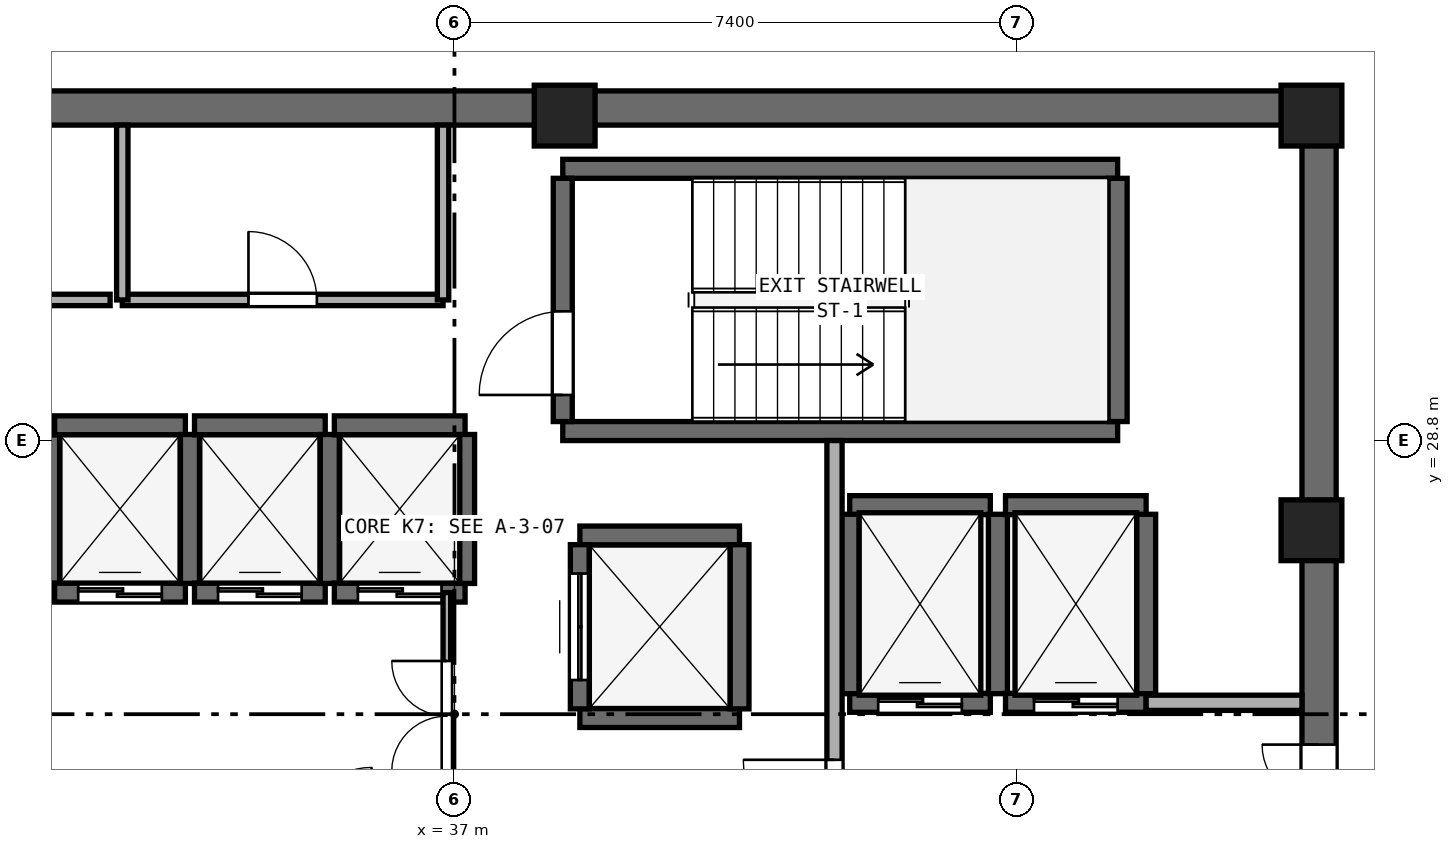
"""IFC4 building model, lengths in metres.
Left out: names, types, materials, properties, quantities, classifications, styles, units other than length and angle.
Written with IfcOpenShell. Run it as: python <this file> out.ifc"""

import sys

from ifc_helpers import new_model, si_unit, direction, frame, frame_2d, origin, origin_2d, place, context, subcontext, project, spatial, rectangle, extrude, element, fill, save


model = new_model("IFC4")
c1 = context("Model", 3, precision=1e-05, world=origin(), true_north=direction((0.0, 1.0)))
c2 = subcontext(c1, "Body", "Model", "MODEL_VIEW")
j1 = project(units=[si_unit("LENGTHUNIT", "METRE"), si_unit("PLANEANGLEUNIT", "RADIAN")], contexts=[c1])
p1 = place(None, origin())
s1 = spatial("IfcSite", under=j1, at=p1, CompositionType="ELEMENT")
p2 = place(p1, origin())
s2 = spatial("IfcBuilding", under=s1, at=p2, CompositionType="ELEMENT")
p3 = place(p2, frame((0.0, 0.0, 225.0)))
s3 = spatial("IfcBuildingStorey", under=s2, at=p3, CompositionType="ELEMENT", Elevation=225.0)
p4 = place(p3, frame((25.4, 33.175, 0.0), z_axis=(0.0, 0.0, 1.0), x_axis=(1.0, 0.0, 0.0)))
e1 = element("IfcWall", 1, at=p4, inside=s3, PredefinedType="SHEAR", context=c2, shape_type="SweptSolid", body=[
    extrude(rectangle(XDim=23.2, YDim=0.45, at=frame_2d((11.6, 0.0))), origin(), (0.0, 0.0, 1.0), 3.51),
])
p5 = place(p3, frame((48.375, 17.45, 0.0), z_axis=(0.0, 0.0, 1.0), x_axis=(0.0, 1.0, 0.0)))
e2 = element("IfcWall", 2, at=p5, inside=s3, PredefinedType="SHEAR", context=c2, shape_type="SweptSolid", body=[
    extrude(rectangle(XDim=15.5, YDim=0.45, at=frame_2d((7.75, 0.0))), origin(), (0.0, 0.0, 1.0), 3.51),
])
p6 = place(p5, frame((5.85, 0.0, 0.0)))
e3 = element("IfcOpeningElement", 3, at=p6, cuts=e2, PredefinedType="OPENING", context=c2, shape_type="SweptSolid", body=[
    extrude(rectangle(XDim=1.5, YDim=2.15, at=frame_2d((0.75, 1.075))), frame((0.0, 0.235, 0.0), z_axis=(0.0, -1.0, 0.0), x_axis=(1.0, 0.0, 0.0)), (0.0, 0.0, 1.0), 0.47),
])
for number, where, z_axis, x_axis in (
    (4, (48.275, 27.62, 0.0), (0.0, 0.0, 1.0), (1.0, 0.0, 0.0)),
    (5, (48.275, 33.075, 0.0), (0.0, 0.0, 1.0), (1.0, 0.0, 0.0)),
    (6, (38.45, 33.075, 0.0), (0.0, 0.0, 1.0), (1.0, 0.0, 0.0)),
):
    element("IfcColumn", number, at=place(p3, frame(where, z_axis=z_axis, x_axis=x_axis)), inside=s3, PredefinedType="PILASTER", context=c2, shape_type="SweptSolid", body=[
        extrude(rectangle(XDim=0.8, YDim=0.8, at=origin_2d()), origin(), (0.0, 0.0, 1.0), 3.8),
    ])
for number, where, z_axis, x_axis in (
    (7, (38.425, 28.925, 0.0), (0.0, 0.0, 1.0), (1.0, 0.0, 0.0)),
    (8, (38.425, 32.375, 0.0), (0.0, 0.0, 1.0), (1.0, 0.0, 0.0)),
):
    element("IfcWall", number, at=place(p3, frame(where, z_axis=z_axis, x_axis=x_axis)), inside=s3, PredefinedType="SHEAR", context=c2, shape_type="SweptSolid", body=[
        extrude(rectangle(XDim=7.3, YDim=0.25, at=frame_2d((3.65, 0.0))), origin(), (0.0, 0.0, 1.0), 3.51),
    ])
p7 = place(p3, frame((38.425, 29.05, 0.0), z_axis=(0.0, 0.0, 1.0), x_axis=(0.0, 1.0, 0.0)))
e9 = element("IfcWall", 9, at=p7, inside=s3, PredefinedType="SHEAR", context=c2, shape_type="SweptSolid", body=[
    extrude(rectangle(XDim=3.2, YDim=0.25, at=frame_2d((1.6, 0.0))), origin(), (0.0, 0.0, 1.0), 3.51),
])
p8 = place(p7, frame((0.35, 0.0, 0.0)))
e10 = element("IfcOpeningElement", 10, at=p8, cuts=e9, PredefinedType="OPENING", context=c2, shape_type="SweptSolid", body=[
    extrude(rectangle(XDim=1.1, YDim=2.15, at=frame_2d((0.55, 1.075))), frame((0.0, 0.135, 0.0), z_axis=(0.0, -1.0, 0.0), x_axis=(1.0, 0.0, 0.0)), (0.0, 0.0, 1.0), 0.27),
])
p9 = place(p3, frame((45.725, 29.05, 0.0), z_axis=(0.0, 0.0, 1.0), x_axis=(0.0, 1.0, 0.0)))
e11 = element("IfcWall", 11, at=p9, inside=s3, PredefinedType="SHEAR", context=c2, shape_type="SweptSolid", body=[
    extrude(rectangle(XDim=3.2, YDim=0.25, at=frame_2d((1.6, 0.0))), origin(), (0.0, 0.0, 1.0), 3.51),
])
p10 = place(p3, frame((31.68, 26.92, 0.0), z_axis=(0.0, 0.0, 1.0), x_axis=(0.0, 1.0, 0.0)))
e12 = element("IfcWall", 12, at=p10, inside=s3, PredefinedType="SHEAR", context=c2, shape_type="SweptSolid", body=[
    extrude(rectangle(XDim=1.96, YDim=0.25, at=frame_2d((0.98, 0.0))), origin(), (0.0, 0.0, 1.0), 3.51),
])
p11 = place(p3, frame((31.74, 26.8, 0.0), z_axis=(0.0, 0.0, 1.0), x_axis=(1.0, 0.0, 0.0)))
e13 = element("IfcWall", 13, at=p11, inside=s3, PredefinedType="SHEAR", context=c2, shape_type="SweptSolid", body=[
    extrude(rectangle(XDim=1.72, YDim=0.25, at=frame_2d((0.86, 0.0))), origin(), (0.0, 0.0, 1.0), 3.51),
])
p12 = place(p11, frame((0.31, 0.0, 0.0)))
e14 = element("IfcOpeningElement", 14, at=p12, cuts=e13, PredefinedType="OPENING", context=c2, shape_type="SweptSolid", body=[
    extrude(rectangle(XDim=1.1, YDim=2.15, at=frame_2d((0.55, 1.075))), frame((0.0, 0.135, 0.0), z_axis=(0.0, -1.0, 0.0), x_axis=(1.0, 0.0, 0.0)), (0.0, 0.0, 1.0), 0.27),
])
p13 = place(p3, frame((31.74, 29.0, 0.0), z_axis=(0.0, 0.0, 1.0), x_axis=(1.0, 0.0, 0.0)))
e15 = element("IfcWall", 15, at=p13, inside=s3, PredefinedType="SHEAR", context=c2, shape_type="SweptSolid", body=[
    extrude(rectangle(XDim=1.72, YDim=0.25, at=frame_2d((0.86, 0.0))), origin(), (0.0, 0.0, 1.0), 3.51),
])
p14 = place(p3, frame((33.52, 26.92, 0.0), z_axis=(0.0, 0.0, 1.0), x_axis=(0.0, 1.0, 0.0)))
e16 = element("IfcWall", 16, at=p14, inside=s3, PredefinedType="SHEAR", context=c2, shape_type="SweptSolid", body=[
    extrude(rectangle(XDim=1.96, YDim=0.25, at=frame_2d((0.98, 0.0))), origin(), (0.0, 0.0, 1.0), 3.51),
])
p15 = place(p3, frame((33.58, 26.8, 0.0), z_axis=(0.0, 0.0, 1.0), x_axis=(1.0, 0.0, 0.0)))
e17 = element("IfcWall", 17, at=p15, inside=s3, PredefinedType="SHEAR", context=c2, shape_type="SweptSolid", body=[
    extrude(rectangle(XDim=1.72, YDim=0.25, at=frame_2d((0.86, 0.0))), origin(), (0.0, 0.0, 1.0), 3.51),
])
p16 = place(p15, frame((0.31, 0.0, 0.0)))
e18 = element("IfcOpeningElement", 18, at=p16, cuts=e17, PredefinedType="OPENING", context=c2, shape_type="SweptSolid", body=[
    extrude(rectangle(XDim=1.1, YDim=2.15, at=frame_2d((0.55, 1.075))), frame((0.0, 0.135, 0.0), z_axis=(0.0, -1.0, 0.0), x_axis=(1.0, 0.0, 0.0)), (0.0, 0.0, 1.0), 0.27),
])
p17 = place(p3, frame((33.58, 29.0, 0.0), z_axis=(0.0, 0.0, 1.0), x_axis=(1.0, 0.0, 0.0)))
e19 = element("IfcWall", 19, at=p17, inside=s3, PredefinedType="SHEAR", context=c2, shape_type="SweptSolid", body=[
    extrude(rectangle(XDim=1.72, YDim=0.25, at=frame_2d((0.86, 0.0))), origin(), (0.0, 0.0, 1.0), 3.51),
])
p18 = place(p3, frame((35.36, 26.92, 0.0), z_axis=(0.0, 0.0, 1.0), x_axis=(0.0, 1.0, 0.0)))
e20 = element("IfcWall", 20, at=p18, inside=s3, PredefinedType="SHEAR", context=c2, shape_type="SweptSolid", body=[
    extrude(rectangle(XDim=1.96, YDim=0.25, at=frame_2d((0.98, 0.0))), origin(), (0.0, 0.0, 1.0), 3.51),
])
p19 = place(p3, frame((35.42, 26.8, 0.0), z_axis=(0.0, 0.0, 1.0), x_axis=(1.0, 0.0, 0.0)))
e21 = element("IfcWall", 21, at=p19, inside=s3, PredefinedType="SHEAR", context=c2, shape_type="SweptSolid", body=[
    extrude(rectangle(XDim=1.72, YDim=0.25, at=frame_2d((0.86, 0.0))), origin(), (0.0, 0.0, 1.0), 3.51),
])
p20 = place(p19, frame((0.31, 0.0, 0.0)))
e22 = element("IfcOpeningElement", 22, at=p20, cuts=e21, PredefinedType="OPENING", context=c2, shape_type="SweptSolid", body=[
    extrude(rectangle(XDim=1.1, YDim=2.15, at=frame_2d((0.55, 1.075))), frame((0.0, 0.135, 0.0), z_axis=(0.0, -1.0, 0.0), x_axis=(1.0, 0.0, 0.0)), (0.0, 0.0, 1.0), 0.27),
])
p21 = place(p3, frame((35.42, 29.0, 0.0), z_axis=(0.0, 0.0, 1.0), x_axis=(1.0, 0.0, 0.0)))
e23 = element("IfcWall", 23, at=p21, inside=s3, PredefinedType="SHEAR", context=c2, shape_type="SweptSolid", body=[
    extrude(rectangle(XDim=1.72, YDim=0.25, at=frame_2d((0.86, 0.0))), origin(), (0.0, 0.0, 1.0), 3.51),
])
p22 = place(p3, frame((37.14, 26.92, 0.0), z_axis=(0.0, 0.0, 1.0), x_axis=(0.0, 1.0, 0.0)))
e24 = element("IfcWall", 24, at=p22, inside=s3, PredefinedType="SHEAR", context=c2, shape_type="SweptSolid", body=[
    extrude(rectangle(XDim=1.96, YDim=0.25, at=frame_2d((0.98, 0.0))), origin(), (0.0, 0.0, 1.0), 3.51),
])
p23 = place(p3, frame((42.2, 25.35, 0.0), z_axis=(0.0, 0.0, 1.0), x_axis=(1.0, 0.0, 0.0)))
e25 = element("IfcWall", 25, at=p23, inside=s3, PredefinedType="SHEAR", context=c2, shape_type="SweptSolid", body=[
    extrude(rectangle(XDim=1.85, YDim=0.25, at=frame_2d((0.925, 0.0))), origin(), (0.0, 0.0, 1.0), 3.51),
])
p24 = place(p23, frame((0.375, 0.0, 0.0)))
e26 = element("IfcOpeningElement", 26, at=p24, cuts=e25, PredefinedType="OPENING", context=c2, shape_type="SweptSolid", body=[
    extrude(rectangle(XDim=1.1, YDim=2.15, at=frame_2d((0.55, 1.075))), frame((0.0, 0.135, 0.0), z_axis=(0.0, -1.0, 0.0), x_axis=(1.0, 0.0, 0.0)), (0.0, 0.0, 1.0), 0.27),
])
p25 = place(p3, frame((42.2, 27.95, 0.0), z_axis=(0.0, 0.0, 1.0), x_axis=(1.0, 0.0, 0.0)))
e27 = element("IfcWall", 27, at=p25, inside=s3, PredefinedType="SHEAR", context=c2, shape_type="SweptSolid", body=[
    extrude(rectangle(XDim=1.85, YDim=0.25, at=frame_2d((0.925, 0.0))), origin(), (0.0, 0.0, 1.0), 3.51),
])
for number, where, z_axis, x_axis in (
    (28, (42.2, 25.47, 0.0), (0.0, 0.0, 1.0), (0.0, 1.0, 0.0)),
    (29, (44.15, 25.47, 0.0), (0.0, 0.0, 1.0), (0.0, 1.0, 0.0)),
):
    element("IfcWall", number, at=place(p3, frame(where, z_axis=z_axis, x_axis=x_axis)), inside=s3, PredefinedType="SHEAR", context=c2, shape_type="SweptSolid", body=[
        extrude(rectangle(XDim=2.36, YDim=0.25, at=frame_2d((1.18, 0.0))), origin(), (0.0, 0.0, 1.0), 3.51),
    ])
p26 = place(p3, frame((44.25, 25.35, 0.0), z_axis=(0.0, 0.0, 1.0), x_axis=(1.0, 0.0, 0.0)))
e30 = element("IfcWall", 30, at=p26, inside=s3, PredefinedType="SHEAR", context=c2, shape_type="SweptSolid", body=[
    extrude(rectangle(XDim=1.85, YDim=0.25, at=frame_2d((0.925, 0.0))), origin(), (0.0, 0.0, 1.0), 3.51),
])
p27 = place(p26, frame((0.375, 0.0, 0.0)))
e31 = element("IfcOpeningElement", 31, at=p27, cuts=e30, PredefinedType="OPENING", context=c2, shape_type="SweptSolid", body=[
    extrude(rectangle(XDim=1.1, YDim=2.15, at=frame_2d((0.55, 1.075))), frame((0.0, 0.135, 0.0), z_axis=(0.0, -1.0, 0.0), x_axis=(1.0, 0.0, 0.0)), (0.0, 0.0, 1.0), 0.27),
])
p28 = place(p3, frame((44.25, 27.95, 0.0), z_axis=(0.0, 0.0, 1.0), x_axis=(1.0, 0.0, 0.0)))
e32 = element("IfcWall", 32, at=p28, inside=s3, PredefinedType="SHEAR", context=c2, shape_type="SweptSolid", body=[
    extrude(rectangle(XDim=1.85, YDim=0.25, at=frame_2d((0.925, 0.0))), origin(), (0.0, 0.0, 1.0), 3.51),
])
p29 = place(p3, frame((46.1, 25.47, 0.0), z_axis=(0.0, 0.0, 1.0), x_axis=(0.0, 1.0, 0.0)))
e33 = element("IfcWall", 33, at=p29, inside=s3, PredefinedType="SHEAR", context=c2, shape_type="SweptSolid", body=[
    extrude(rectangle(XDim=2.36, YDim=0.25, at=frame_2d((1.18, 0.0))), origin(), (0.0, 0.0, 1.0), 3.51),
])
for number, where, z_axis, x_axis in (
    (34, (38.65, 25.15, 0.0), (0.0, 0.0, 1.0), (1.0, 0.0, 0.0)),
    (35, (38.65, 27.55, 0.0), (0.0, 0.0, 1.0), (1.0, 0.0, 0.0)),
):
    element("IfcWall", number, at=place(p3, frame(where, z_axis=z_axis, x_axis=x_axis)), inside=s3, PredefinedType="SHEAR", context=c2, shape_type="SweptSolid", body=[
        extrude(rectangle(XDim=2.1, YDim=0.25, at=frame_2d((1.05, 0.0))), origin(), (0.0, 0.0, 1.0), 3.51),
    ])
p30 = place(p3, frame((38.65, 25.27, 0.0), z_axis=(0.0, 0.0, 1.0), x_axis=(0.0, 1.0, 0.0)))
e36 = element("IfcWall", 36, at=p30, inside=s3, PredefinedType="SHEAR", context=c2, shape_type="SweptSolid", body=[
    extrude(rectangle(XDim=2.16, YDim=0.25, at=frame_2d((1.08, 0.0))), origin(), (0.0, 0.0, 1.0), 3.51),
])
p31 = place(p30, frame((0.38, 0.0, 0.0)))
e37 = element("IfcOpeningElement", 37, at=p31, cuts=e36, PredefinedType="OPENING", context=c2, shape_type="SweptSolid", body=[
    extrude(rectangle(XDim=1.4, YDim=2.2, at=frame_2d((0.7, 1.1))), frame((0.0, 0.135, 0.0), z_axis=(0.0, -1.0, 0.0), x_axis=(1.0, 0.0, 0.0)), (0.0, 0.0, 1.0), 0.27),
])
p32 = place(p3, frame((40.75, 25.27, 0.0), z_axis=(0.0, 0.0, 1.0), x_axis=(0.0, 1.0, 0.0)))
e38 = element("IfcWall", 38, at=p32, inside=s3, PredefinedType="SHEAR", context=c2, shape_type="SweptSolid", body=[
    extrude(rectangle(XDim=2.16, YDim=0.25, at=frame_2d((1.08, 0.0))), origin(), (0.0, 0.0, 1.0), 3.51),
])
p33 = place(p3, frame((42.0, 22.75, 0.0), z_axis=(0.0, 0.0, 1.0), x_axis=(0.0, 1.0, 0.0)))
e39 = element("IfcWall", 39, at=p33, inside=s3, PredefinedType="SOLIDWALL", context=c2, shape_type="SweptSolid", body=[
    extrude(rectangle(XDim=6.05, YDim=0.2, at=frame_2d((3.025, 0.0))), origin(), (0.0, 0.0, 1.0), 3.51),
])
p34 = place(p33, frame((0.65, 0.0, 0.0)))
e40 = element("IfcOpeningElement", 40, at=p34, cuts=e39, PredefinedType="OPENING", context=c2, shape_type="SweptSolid", body=[
    extrude(rectangle(XDim=1.2, YDim=2.15, at=frame_2d((0.6, 1.075))), frame((0.0, 0.11, 0.0), z_axis=(0.0, -1.0, 0.0), x_axis=(1.0, 0.0, 0.0)), (0.0, 0.0, 1.0), 0.22),
])
p35 = place(p3, frame((46.1, 25.35, 0.0), z_axis=(0.0, 0.0, 1.0), x_axis=(1.0, 0.0, 0.0)))
e41 = element("IfcWall", 41, at=p35, inside=s3, PredefinedType="SOLIDWALL", context=c2, shape_type="SweptSolid", body=[
    extrude(rectangle(XDim=2.05, YDim=0.2, at=frame_2d((1.025, 0.0))), origin(), (0.0, 0.0, 1.0), 3.51),
])
p36 = place(p3, frame((29.28, 30.65, 0.0), z_axis=(0.0, 0.0, 1.0), x_axis=(1.0, 0.0, 0.0)))
e42 = element("IfcWall", 42, at=p36, inside=s3, PredefinedType="PARTITIONING", context=c2, shape_type="SweptSolid", body=[
    extrude(rectangle(XDim=3.19, YDim=0.15, at=frame_2d((1.595, 0.0))), origin(), (0.0, 0.0, 1.0), 3.51),
])
p37 = place(p36, frame((1.12, 0.0, 0.0)))
e43 = element("IfcOpeningElement", 43, at=p37, cuts=e42, PredefinedType="OPENING", context=c2, shape_type="SweptSolid", body=[
    extrude(rectangle(XDim=0.95, YDim=2.1, at=frame_2d((0.475, 1.05))), frame((0.0, 0.085, 0.0), z_axis=(0.0, -1.0, 0.0), x_axis=(1.0, 0.0, 0.0)), (0.0, 0.0, 1.0), 0.17),
])
p38 = place(p3, frame((32.63, 30.65, 0.0), z_axis=(0.0, 0.0, 1.0), x_axis=(1.0, 0.0, 0.0)))
e44 = element("IfcWall", 44, at=p38, inside=s3, PredefinedType="PARTITIONING", context=c2, shape_type="SweptSolid", body=[
    extrude(rectangle(XDim=4.22, YDim=0.15, at=frame_2d((2.11, 0.0))), origin(), (0.0, 0.0, 1.0), 3.51),
])
p39 = place(p38, frame((1.66, 0.0, 0.0)))
e45 = element("IfcOpeningElement", 45, at=p39, cuts=e44, PredefinedType="OPENING", context=c2, shape_type="SweptSolid", body=[
    extrude(rectangle(XDim=0.9, YDim=2.1, at=frame_2d((0.45, 1.05))), frame((0.0, 0.085, 0.0), z_axis=(0.0, -1.0, 0.0), x_axis=(1.0, 0.0, 0.0)), (0.0, 0.0, 1.0), 0.17),
])
for number, where, z_axis, x_axis in (
    (46, (32.63, 30.65, 0.0), (0.0, 0.0, 1.0), (0.0, 1.0, 0.0)),
    (47, (36.85, 30.65, 0.0), (0.0, 0.0, 1.0), (0.0, 1.0, 0.0)),
):
    element("IfcWall", number, at=place(p3, frame(where, z_axis=z_axis, x_axis=x_axis)), inside=s3, PredefinedType="PARTITIONING", context=c2, shape_type="SweptSolid", body=[
        extrude(rectangle(XDim=2.3, YDim=0.15, at=frame_2d((1.15, 0.0))), origin(), (0.0, 0.0, 1.0), 3.51),
    ])
p40 = place(p3, frame((36.9, 23.6, 0.0), z_axis=(0.0, 0.0, 1.0), x_axis=(0.0, 1.0, 0.0)))
e48 = element("IfcWall", 48, at=p40, inside=s3, PredefinedType="PARTITIONING", context=c2, shape_type="SweptSolid", body=[
    extrude(rectangle(XDim=3.2, YDim=0.1, at=frame_2d((1.6, 0.0))), origin(), (0.0, 0.0, 1.0), 3.51),
])
p41 = place(p40, frame((0.85, 0.0, 0.0)))
e49 = element("IfcOpeningElement", 49, at=p41, cuts=e48, PredefinedType="OPENING", context=c2, shape_type="SweptSolid", body=[
    extrude(rectangle(XDim=1.45, YDim=2.12, at=frame_2d((0.725, 1.06))), frame((0.0, 0.06, 0.0), z_axis=(0.0, -1.0, 0.0), x_axis=(1.0, 0.0, 0.0)), (0.0, 0.0, 1.0), 0.12),
])
p42 = place(p8, origin())
e50 = element("IfcDoor", 50, at=p42, inside=s3, OperationType="SINGLE_SWING_LEFT", PredefinedType="DOOR", context=c2, shape_type="SweptSolid", body=[
    extrude(rectangle(XDim=1.1, YDim=2.15, at=frame_2d((0.55, 1.075))), frame((0.0, 0.025, 0.0), z_axis=(0.0, -1.0, 0.0), x_axis=(1.0, 0.0, 0.0)), (0.0, 0.0, 1.0), 0.05),
])
fill(e10, e50)
p43 = place(p12, origin())
e51 = element("IfcDoor", 51, at=p43, inside=s3, OperationType="DOUBLE_DOOR_SLIDING", PredefinedType="DOOR", context=c2, shape_type="SweptSolid", body=[
    extrude(rectangle(XDim=1.1, YDim=2.15, at=frame_2d((0.55, 1.075))), frame((0.0, 0.025, 0.0), z_axis=(0.0, -1.0, 0.0), x_axis=(1.0, 0.0, 0.0)), (0.0, 0.0, 1.0), 0.05),
])
fill(e14, e51)
p44 = place(p16, origin())
e52 = element("IfcDoor", 52, at=p44, inside=s3, OperationType="DOUBLE_DOOR_SLIDING", PredefinedType="DOOR", context=c2, shape_type="SweptSolid", body=[
    extrude(rectangle(XDim=1.1, YDim=2.15, at=frame_2d((0.55, 1.075))), frame((0.0, 0.025, 0.0), z_axis=(0.0, -1.0, 0.0), x_axis=(1.0, 0.0, 0.0)), (0.0, 0.0, 1.0), 0.05),
])
fill(e18, e52)
p45 = place(p20, origin())
e53 = element("IfcDoor", 53, at=p45, inside=s3, OperationType="DOUBLE_DOOR_SLIDING", PredefinedType="DOOR", context=c2, shape_type="SweptSolid", body=[
    extrude(rectangle(XDim=1.1, YDim=2.15, at=frame_2d((0.55, 1.075))), frame((0.0, 0.025, 0.0), z_axis=(0.0, -1.0, 0.0), x_axis=(1.0, 0.0, 0.0)), (0.0, 0.0, 1.0), 0.05),
])
fill(e22, e53)
p46 = place(p24, origin())
e54 = element("IfcDoor", 54, at=p46, inside=s3, OperationType="DOUBLE_DOOR_SLIDING", PredefinedType="DOOR", context=c2, shape_type="SweptSolid", body=[
    extrude(rectangle(XDim=1.1, YDim=2.15, at=frame_2d((0.55, 1.075))), frame((0.0, 0.025, 0.0), z_axis=(0.0, -1.0, 0.0), x_axis=(1.0, 0.0, 0.0)), (0.0, 0.0, 1.0), 0.05),
])
fill(e26, e54)
p47 = place(p27, origin())
e55 = element("IfcDoor", 55, at=p47, inside=s3, OperationType="DOUBLE_DOOR_SLIDING", PredefinedType="DOOR", context=c2, shape_type="SweptSolid", body=[
    extrude(rectangle(XDim=1.1, YDim=2.15, at=frame_2d((0.55, 1.075))), frame((0.0, 0.025, 0.0), z_axis=(0.0, -1.0, 0.0), x_axis=(1.0, 0.0, 0.0)), (0.0, 0.0, 1.0), 0.05),
])
fill(e31, e55)
p48 = place(p31, origin())
e56 = element("IfcDoor", 56, at=p48, inside=s3, OperationType="DOUBLE_DOOR_SLIDING", PredefinedType="DOOR", context=c2, shape_type="SweptSolid", body=[
    extrude(rectangle(XDim=1.4, YDim=2.2, at=frame_2d((0.7, 1.1))), frame((0.0, 0.025, 0.0), z_axis=(0.0, -1.0, 0.0), x_axis=(1.0, 0.0, 0.0)), (0.0, 0.0, 1.0), 0.05),
])
fill(e37, e56)
p49 = place(p34, origin())
e57 = element("IfcDoor", 57, at=p49, inside=s3, OperationType="SINGLE_SWING_RIGHT", PredefinedType="DOOR", context=c2, shape_type="SweptSolid", body=[
    extrude(rectangle(XDim=1.2, YDim=2.15, at=frame_2d((0.6, 1.075))), frame((0.0, 0.025, 0.0), z_axis=(0.0, -1.0, 0.0), x_axis=(1.0, 0.0, 0.0)), (0.0, 0.0, 1.0), 0.05),
])
fill(e40, e57)
p50 = place(p6, origin())
e58 = element("IfcDoor", 58, at=p50, inside=s3, OperationType="DOUBLE_DOOR_SINGLE_SWING", PredefinedType="DOOR", context=c2, shape_type="SweptSolid", body=[
    extrude(rectangle(XDim=1.5, YDim=2.15, at=frame_2d((0.75, 1.075))), frame((0.0, 0.025, 0.0), z_axis=(0.0, -1.0, 0.0), x_axis=(1.0, 0.0, 0.0)), (0.0, 0.0, 1.0), 0.05),
])
fill(e3, e58)
p51 = place(p39, origin())
e59 = element("IfcDoor", 59, at=p51, inside=s3, OperationType="SINGLE_SWING_LEFT", PredefinedType="DOOR", context=c2, shape_type="SweptSolid", body=[
    extrude(rectangle(XDim=0.9, YDim=2.1, at=frame_2d((0.45, 1.05))), frame((0.0, 0.025, 0.0), z_axis=(0.0, -1.0, 0.0), x_axis=(1.0, 0.0, 0.0)), (0.0, 0.0, 1.0), 0.05),
])
fill(e45, e59)
p52 = place(p41, origin())
e60 = element("IfcDoor", 60, at=p52, inside=s3, OperationType="DOUBLE_DOOR_SINGLE_SWING", PredefinedType="DOOR", context=c2, shape_type="SweptSolid", body=[
    extrude(rectangle(XDim=1.45, YDim=2.12, at=frame_2d((0.725, 1.06))), frame((0.0, 0.025, 0.0), z_axis=(0.0, -1.0, 0.0), x_axis=(1.0, 0.0, 0.0)), (0.0, 0.0, 1.0), 0.05),
])
fill(e49, e60)
save(model, sys.argv[1])
